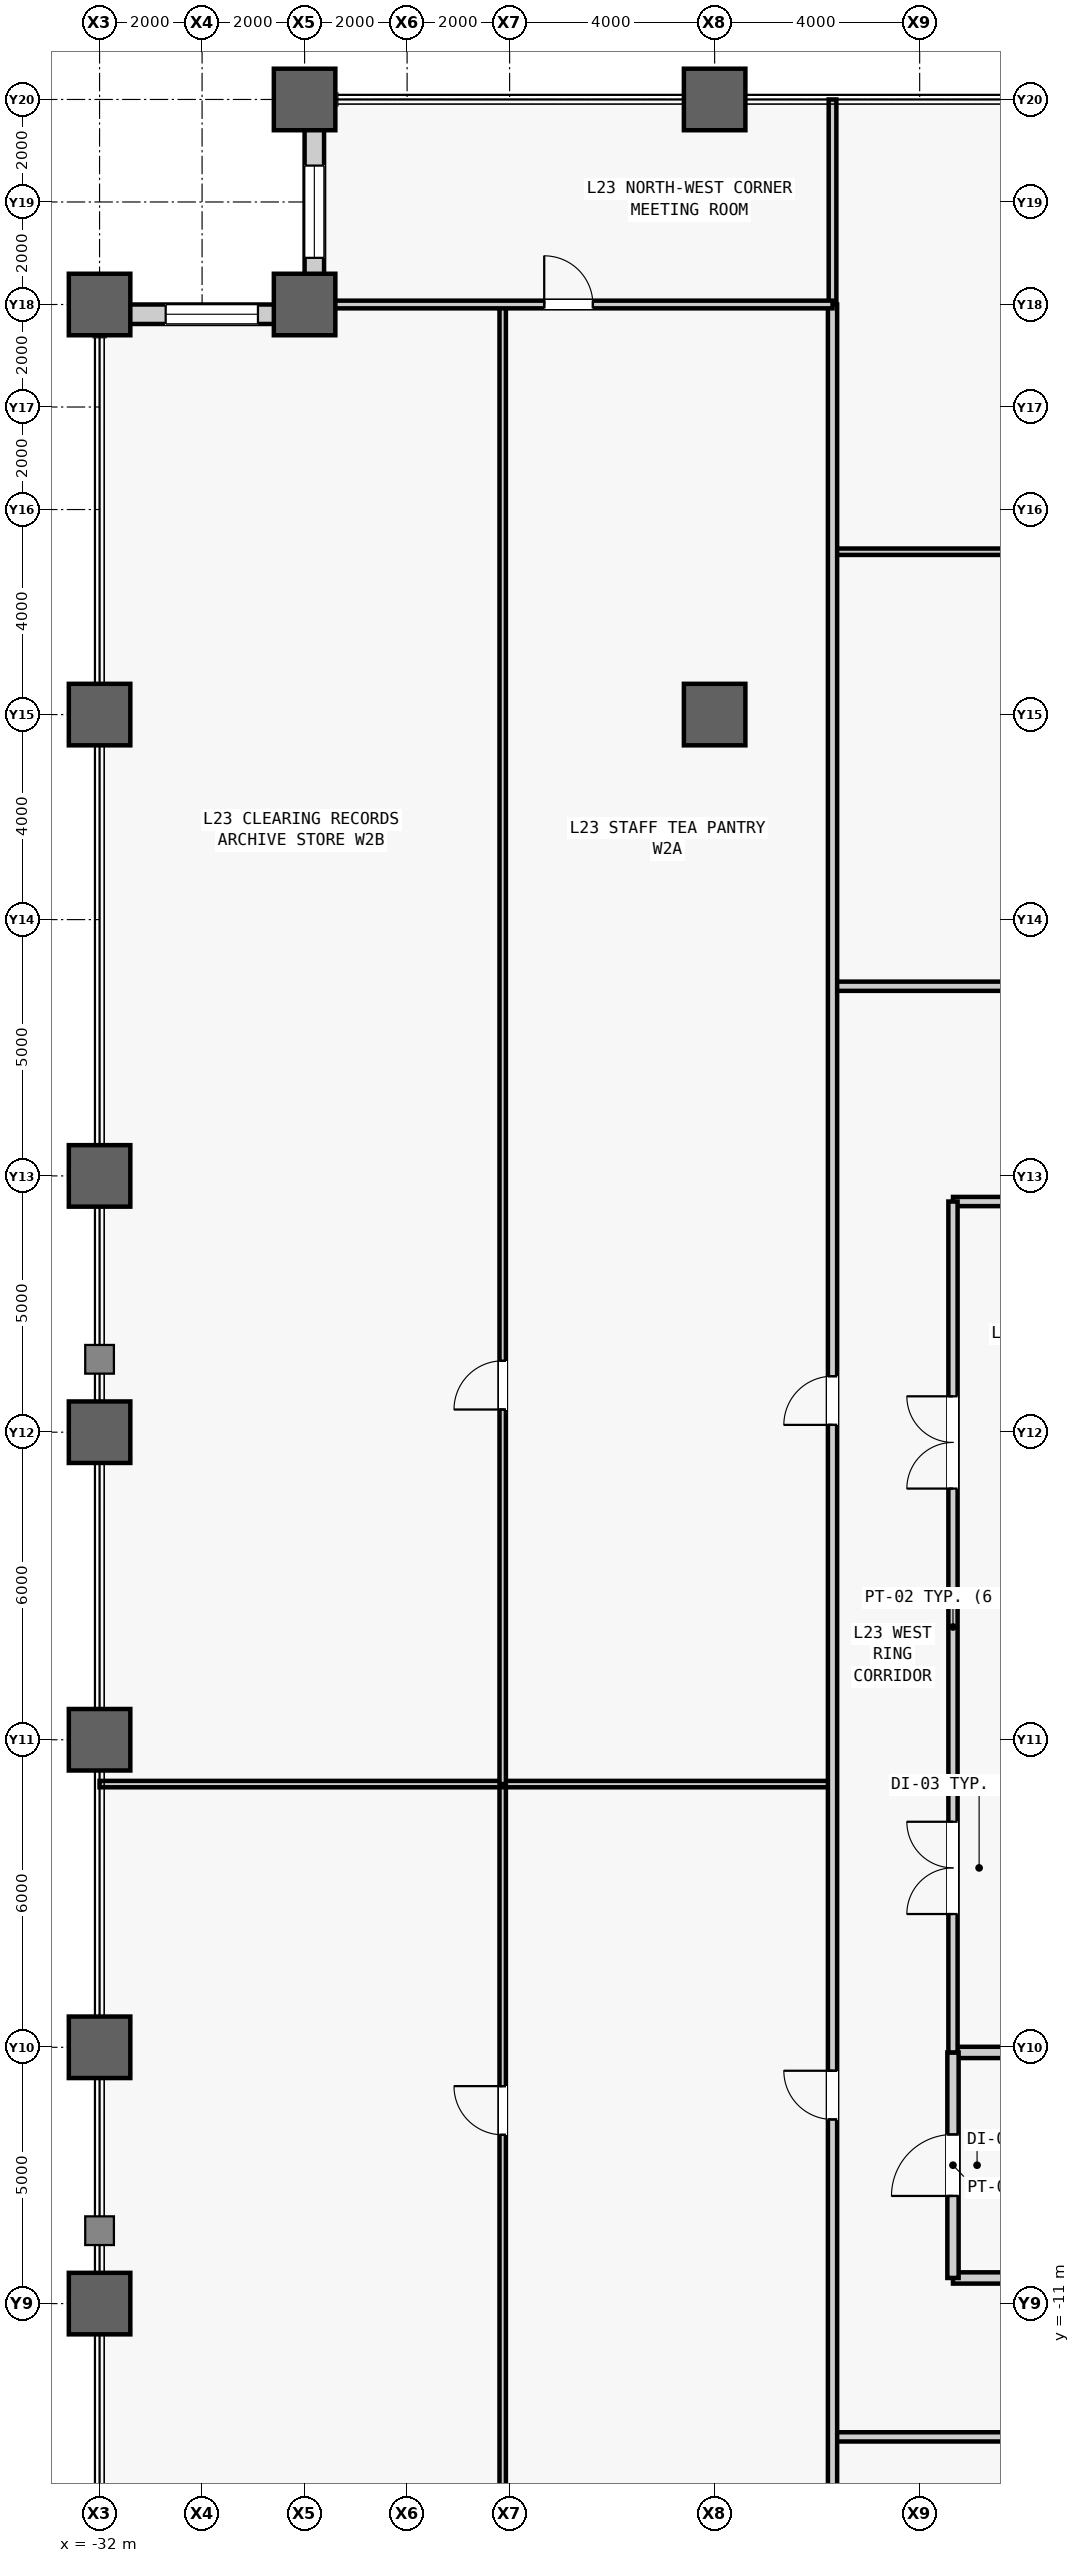
"""IFC4 building model, lengths in metres.
Left out: names, types, materials, properties, quantities, classifications, styles, units other than length and angle.
Written with IfcOpenShell. Run it as: python <this file> out.ifc"""

import sys

from ifc_helpers import new_model, si_unit, direction, frame, frame_2d, origin, origin_2d, place, context, subcontext, project, spatial, rectangle, hollow_rectangle, extrude, source, transform, mapped, element, fill, save


model = new_model("IFC4")
c1 = context("Model", 3, precision=1e-05, world=origin(), true_north=direction((0.0, 1.0)))
c2 = subcontext(c1, "Body", "Model", "MODEL_VIEW")
j1 = project(units=[si_unit("LENGTHUNIT", "METRE"), si_unit("PLANEANGLEUNIT", "RADIAN")], contexts=[c1])
p1 = place(None, origin())
s1 = spatial("IfcSite", under=j1, at=p1, CompositionType="ELEMENT")
p2 = place(p1, origin())
s2 = spatial("IfcBuilding", under=s1, at=p2, CompositionType="ELEMENT")
p3 = place(p2, frame((0.0, 0.0, 103.7)))
s3 = spatial("IfcBuildingStorey", under=s2, at=p3, CompositionType="ELEMENT", Elevation=103.7)
m1 = source(origin(), c2, "Body", "SweptSolid", [
    extrude(hollow_rectangle(XDim=1.2, YDim=1.2, WallThickness=0.07, at=origin_2d()), origin(), (0.0, 0.0, 1.0), 4.1),
])
for number, where, z_axis, x_axis in (
    (1, (-32.0, -11.0, 0.0), (0.0, 0.0, 1.0), (1.0, 0.0, 0.0)),
    (2, (-32.0, -6.0, 0.0), (0.0, 0.0, 1.0), (1.0, 0.0, 0.0)),
    (3, (-32.0, 0.0, 0.0), (0.0, 0.0, 1.0), (1.0, 0.0, 0.0)),
    (4, (-32.0, 6.0, 0.0), (0.0, 0.0, 1.0), (1.0, 0.0, 0.0)),
    (5, (-32.0, 11.0, 0.0), (0.0, 0.0, 1.0), (1.0, 0.0, 0.0)),
    (6, (-32.0, 20.0, 0.0), (0.0, 0.0, 1.0), (1.0, 0.0, 0.0)),
    (7, (-32.0, 28.0, 0.0), (0.0, 0.0, 1.0), (1.0, 0.0, 0.0)),
    (8, (-28.0, 28.0, 0.0), (0.0, 0.0, 1.0), (1.0, 0.0, 0.0)),
    (9, (-28.0, 32.0, 0.0), (0.0, 0.0, 1.0), (1.0, 0.0, 0.0)),
    (10, (-20.0, 20.0, 0.0), (0.0, 0.0, 1.0), (1.0, 0.0, 0.0)),
    (11, (-20.0, 32.0, 0.0), (0.0, 0.0, 1.0), (1.0, 0.0, 0.0)),
):
    element("IfcColumn", number, at=place(p3, frame(where, z_axis=z_axis, x_axis=x_axis)), inside=s3, PredefinedType="COLUMN", context=c2, shape_type="MappedRepresentation", body=[
        mapped(m1, transform((0.0, 0.0, 0.0), scale=1.0)),
    ])
m2 = source(origin(), c2, "Body", "SweptSolid", [
    extrude(rectangle(XDim=3.62, YDim=0.38, at=frame_2d((1.81, 0.0))), origin(), (0.0, 0.0, 1.0), 3.145),
])
p4 = place(p3, frame((-27.81, 28.0, 0.0), z_axis=(0.0, 0.0, 1.0), x_axis=(0.0, 1.0, 0.0)))
e12 = element("IfcWall", 12, at=p4, inside=s3, PredefinedType="STANDARD", context=c2, shape_type="MappedRepresentation", body=[
    mapped(m2, transform((0.0, 0.0, 0.0), scale=1.0)),
])
m3 = source(origin(), c2, "Body", "SweptSolid", [
    extrude(rectangle(XDim=1.8, YDim=2.4, at=frame_2d((0.9, 1.2))), frame((0.0, 0.2, 0.0), z_axis=(0.0, -1.0, 0.0), x_axis=(1.0, 0.0, 0.0)), (0.0, 0.0, 1.0), 0.4),
])
p5 = place(p4, frame((0.91, 0.0, 0.5)))
e13 = element("IfcOpeningElement", 13, at=p5, cuts=e12, PredefinedType="OPENING", context=c2, shape_type="MappedRepresentation", body=[
    mapped(m3, transform((0.0, 0.0, 0.0), scale=1.0)),
])
p6 = place(p3, frame((-28.0, 27.81, 0.0), z_axis=(0.0, 0.0, 1.0), x_axis=(-1.0, 0.0, 0.0)))
e14 = element("IfcWall", 14, at=p6, inside=s3, PredefinedType="STANDARD", context=c2, shape_type="MappedRepresentation", body=[
    mapped(m2, transform((0.0, 0.0, 0.0), scale=1.0)),
])
p7 = place(p6, frame((0.91, 0.0, 0.5)))
e15 = element("IfcOpeningElement", 15, at=p7, cuts=e14, PredefinedType="OPENING", context=c2, shape_type="MappedRepresentation", body=[
    mapped(m3, transform((0.0, 0.0, 0.0), scale=1.0)),
])
m4 = source(origin(), c2, "Body", "SweptSolid", [
    extrude(rectangle(XDim=4.05, YDim=0.22, at=frame_2d((2.025, 0.0))), origin(), (0.0, 0.0, 1.0), 3.84),
])
p8 = place(p3, frame((-15.35, -10.5, 0.0), z_axis=(0.0, 0.0, 1.0), x_axis=(1.0, 0.0, 0.0)))
e16 = element("IfcWall", 16, at=p8, inside=s3, PredefinedType="PARTITIONING", context=c2, shape_type="MappedRepresentation", body=[
    mapped(m4, transform((0.0, 0.0, 0.0), scale=1.0)),
])
m5 = source(origin(), c2, "Body", "SweptSolid", [
    extrude(rectangle(XDim=4.05, YDim=0.22, at=frame_2d((2.025, 0.0))), origin(), (0.0, 0.0, 1.0), 3.067),
])
p9 = place(p3, frame((-15.35, -6.1, 0.0), z_axis=(0.0, 0.0, 1.0), x_axis=(1.0, 0.0, 0.0)))
e17 = element("IfcWall", 17, at=p9, inside=s3, PredefinedType="PARTITIONING", context=c2, shape_type="MappedRepresentation", body=[
    mapped(m5, transform((0.0, 0.0, 0.0), scale=1.0)),
])
m6 = source(origin(), c2, "Body", "SweptSolid", [
    extrude(rectangle(XDim=4.4, YDim=0.22, at=frame_2d((2.2, 0.0))), origin(), (0.0, 0.0, 1.0), 3.84),
])
p10 = place(p3, frame((-15.35, -10.5, 0.0), z_axis=(0.0, 0.0, 1.0), x_axis=(0.0, 1.0, 0.0)))
e18 = element("IfcWall", 18, at=p10, inside=s3, PredefinedType="PARTITIONING", context=c2, shape_type="MappedRepresentation", body=[
    mapped(m6, transform((0.0, 0.0, 0.0), scale=1.0)),
])
m7 = source(origin(), c2, "Body", "SweptSolid", [
    extrude(rectangle(XDim=1.2, YDim=2.2, at=frame_2d((0.6, 1.1))), frame((0.0, 0.12, 0.0), z_axis=(0.0, -1.0, 0.0), x_axis=(1.0, 0.0, 0.0)), (0.0, 0.0, 1.0), 0.24),
])
p11 = place(p10, frame((1.6, 0.0, 0.0)))
e19 = element("IfcOpeningElement", 19, at=p11, cuts=e18, PredefinedType="OPENING", context=c2, shape_type="MappedRepresentation", body=[
    mapped(m7, transform((0.0, 0.0, 0.0), scale=1.0)),
])
m8 = source(origin(), c2, "Body", "SweptSolid", [
    extrude(rectangle(XDim=4.05, YDim=0.18, at=frame_2d((2.025, 0.0))), origin(), (0.0, 0.0, 1.0), 3.84),
])
p12 = place(p3, frame((-15.35, 10.5, 0.0), z_axis=(0.0, 0.0, 1.0), x_axis=(1.0, 0.0, 0.0)))
e20 = element("IfcWall", 20, at=p12, inside=s3, PredefinedType="PARTITIONING", context=c2, shape_type="MappedRepresentation", body=[
    mapped(m8, transform((0.0, 0.0, 0.0), scale=1.0)),
])
m9 = source(origin(), c2, "Body", "SweptSolid", [
    extrude(rectangle(XDim=16.6, YDim=0.18, at=frame_2d((8.3, 0.0))), origin(), (0.0, 0.0, 1.0), 3.84),
])
p13 = place(p3, frame((-15.35, -6.1, 0.0), z_axis=(0.0, 0.0, 1.0), x_axis=(0.0, 1.0, 0.0)))
e21 = element("IfcWall", 21, at=p13, inside=s3, PredefinedType="PARTITIONING", context=c2, shape_type="MappedRepresentation", body=[
    mapped(m9, transform((0.0, 0.0, 0.0), scale=1.0)),
])
m10 = source(origin(), c2, "Body", "SweptSolid", [
    extrude(rectangle(XDim=1.8, YDim=2.25, at=frame_2d((0.9, 1.125))), frame((0.0, 0.1, 0.0), z_axis=(0.0, -1.0, 0.0), x_axis=(1.0, 0.0, 0.0)), (0.0, 0.0, 1.0), 0.2),
])
p14 = place(p13, frame((2.7, 0.0, 0.0)))
e22 = element("IfcOpeningElement", 22, at=p14, cuts=e21, PredefinedType="OPENING", context=c2, shape_type="MappedRepresentation", body=[
    mapped(m10, transform((0.0, 0.0, 0.0), scale=1.0)),
])
p15 = place(p13, frame((11.0, 0.0, 0.0)))
e23 = element("IfcOpeningElement", 23, at=p15, cuts=e21, PredefinedType="OPENING", context=c2, shape_type="MappedRepresentation", body=[
    mapped(m10, transform((0.0, 0.0, 0.0), scale=1.0)),
])
m11 = source(origin(), c2, "Body", "SweptSolid", [
    extrude(rectangle(XDim=36.25, YDim=0.18, at=frame_2d((18.125, 0.0))), origin(), (0.0, 0.0, 1.0), 3.84),
])
p16 = place(p3, frame((-17.7, -13.6, 0.0), z_axis=(0.0, 0.0, 1.0), x_axis=(1.0, 0.0, 0.0)))
e24 = element("IfcWall", 24, at=p16, inside=s3, PredefinedType="PARTITIONING", context=c2, shape_type="MappedRepresentation", body=[
    mapped(m11, transform((0.0, 0.0, 0.0), scale=1.0)),
])
m12 = source(origin(), c2, "Body", "SweptSolid", [
    extrude(rectangle(XDim=1.05, YDim=2.2, at=frame_2d((0.525, 1.1))), frame((0.0, 0.1, 0.0), z_axis=(0.0, -1.0, 0.0), x_axis=(1.0, 0.0, 0.0)), (0.0, 0.0, 1.0), 0.2),
])
p17 = place(p16, frame((6.925, 0.0, 0.0)))
e25 = element("IfcOpeningElement", 25, at=p17, cuts=e24, PredefinedType="OPENING", context=c2, shape_type="MappedRepresentation", body=[
    mapped(m12, transform((0.0, 0.0, 0.0), scale=1.0)),
])
p18 = place(p16, frame((17.6, 0.0, 0.0)))
e26 = element("IfcOpeningElement", 26, at=p18, cuts=e24, PredefinedType="OPENING", context=c2, shape_type="MappedRepresentation", body=[
    mapped(m12, transform((0.0, 0.0, 0.0), scale=1.0)),
])
p19 = place(p16, frame((27.85, 0.0, 0.0)))
e27 = element("IfcOpeningElement", 27, at=p19, cuts=e24, PredefinedType="OPENING", context=c2, shape_type="MappedRepresentation", body=[
    mapped(m12, transform((0.0, 0.0, 0.0), scale=1.0)),
])
m13 = source(origin(), c2, "Body", "SweptSolid", [
    extrude(rectangle(XDim=36.25, YDim=0.125, at=frame_2d((18.125, 0.0))), origin(), (0.0, 0.0, 1.0), 3.84),
])
p20 = place(p3, frame((-17.7, 23.177, 0.0), z_axis=(0.0, 0.0, 1.0), x_axis=(1.0, 0.0, 0.0)))
e28 = element("IfcWall", 28, at=p20, inside=s3, PredefinedType="PARTITIONING", context=c2, shape_type="MappedRepresentation", body=[
    mapped(m13, transform((0.0, 0.0, 0.0), scale=1.0)),
])
m14 = source(origin(), c2, "Body", "SweptSolid", [
    extrude(rectangle(XDim=0.95, YDim=2.15, at=frame_2d((0.475, 1.075))), frame((0.0, 0.073, 0.0), z_axis=(0.0, -1.0, 0.0), x_axis=(1.0, 0.0, 0.0)), (0.0, 0.0, 1.0), 0.145),
])
p21 = place(p20, frame((17.65, 0.0, 0.0)))
e29 = element("IfcOpeningElement", 29, at=p21, cuts=e28, PredefinedType="OPENING", context=c2, shape_type="MappedRepresentation", body=[
    mapped(m14, transform((0.0, 0.0, 0.0), scale=1.0)),
])
p22 = place(p3, frame((-17.7, 14.7, 0.0), z_axis=(0.0, 0.0, 1.0), x_axis=(1.0, 0.0, 0.0)))
e30 = element("IfcWall", 30, at=p22, inside=s3, PredefinedType="PARTITIONING", context=c2, shape_type="MappedRepresentation", body=[
    mapped(m11, transform((0.0, 0.0, 0.0), scale=1.0)),
])
p23 = place(p22, frame((17.175, 0.0, 0.0)))
e31 = element("IfcOpeningElement", 31, at=p23, cuts=e30, PredefinedType="OPENING", context=c2, shape_type="MappedRepresentation", body=[
    mapped(m12, transform((0.0, 0.0, 0.0), scale=1.0)),
])
m15 = source(origin(), c2, "Body", "SweptSolid", [
    extrude(rectangle(XDim=4.0, YDim=0.15, at=frame_2d((2.0, 0.0))), origin(), (0.0, 0.0, 1.0), 3.84),
])
p24 = place(p3, frame((-17.7, 28.0, 0.0), z_axis=(0.0, 0.0, 1.0), x_axis=(0.0, 1.0, 0.0)))
e32 = element("IfcWall", 32, at=p24, inside=s3, PredefinedType="PARTITIONING", context=c2, shape_type="MappedRepresentation", body=[
    mapped(m15, transform((0.0, 0.0, 0.0), scale=1.0)),
])
m16 = source(origin(), c2, "Body", "SweptSolid", [
    extrude(rectangle(XDim=27.135, YDim=0.125, at=frame_2d((13.567, 0.0))), origin(), (0.0, 0.0, 1.0), 3.84),
])
p25 = place(p3, frame((-24.135, -28.0, 0.0), z_axis=(0.0, 0.0, 1.0), x_axis=(0.0, 1.0, 0.0)))
e33 = element("IfcWall", 33, at=p25, inside=s3, PredefinedType="PARTITIONING", context=c2, shape_type="MappedRepresentation", body=[
    mapped(m16, transform((0.0, 0.0, 0.0), scale=1.0)),
])
p26 = place(p25, frame((20.292, 0.0, 0.0)))
e34 = element("IfcOpeningElement", 34, at=p26, cuts=e33, PredefinedType="OPENING", context=c2, shape_type="MappedRepresentation", body=[
    mapped(m14, transform((0.0, 0.0, 0.0), scale=1.0)),
])
m17 = source(origin(), c2, "Body", "SweptSolid", [
    extrude(rectangle(XDim=14.3, YDim=0.125, at=frame_2d((7.15, 0.0))), origin(), (0.0, 0.0, 1.0), 3.84),
])
p27 = place(p3, frame((-32.0, -0.865, 0.0), z_axis=(0.0, 0.0, 1.0), x_axis=(1.0, 0.0, 0.0)))
e35 = element("IfcWall", 35, at=p27, inside=s3, PredefinedType="PARTITIONING", context=c2, shape_type="MappedRepresentation", body=[
    mapped(m17, transform((0.0, 0.0, 0.0), scale=1.0)),
])
m18 = source(origin(), c2, "Body", "SweptSolid", [
    extrude(rectangle(XDim=28.865, YDim=0.125, at=frame_2d((14.433, 0.0))), origin(), (0.0, 0.0, 1.0), 3.84),
])
p28 = place(p3, frame((-24.135, -0.865, 0.0), z_axis=(0.0, 0.0, 1.0), x_axis=(0.0, 1.0, 0.0)))
e36 = element("IfcWall", 36, at=p28, inside=s3, PredefinedType="PARTITIONING", context=c2, shape_type="MappedRepresentation", body=[
    mapped(m18, transform((0.0, 0.0, 0.0), scale=1.0)),
])
p29 = place(p28, frame((7.308, 0.0, 0.0)))
e37 = element("IfcOpeningElement", 37, at=p29, cuts=e36, PredefinedType="OPENING", context=c2, shape_type="MappedRepresentation", body=[
    mapped(m14, transform((0.0, 0.0, 0.0), scale=1.0)),
])
m19 = source(origin(), c2, "Body", "SweptSolid", [
    extrude(rectangle(XDim=56.0, YDim=0.18, at=frame_2d((28.0, 0.0))), origin(), (0.0, 0.0, 1.0), 3.84),
])
p30 = place(p3, frame((-17.7, -28.0, 0.0), z_axis=(0.0, 0.0, 1.0), x_axis=(0.0, 1.0, 0.0)))
e38 = element("IfcWall", 38, at=p30, inside=s3, PredefinedType="PARTITIONING", context=c2, shape_type="MappedRepresentation", body=[
    mapped(m19, transform((0.0, 0.0, 0.0), scale=1.0)),
])
m20 = source(origin(), c2, "Body", "SweptSolid", [
    extrude(rectangle(XDim=0.95, YDim=2.15, at=frame_2d((0.475, 1.075))), frame((0.0, 0.1, 0.0), z_axis=(0.0, -1.0, 0.0), x_axis=(1.0, 0.0, 0.0)), (0.0, 0.0, 1.0), 0.2),
])
p31 = place(p30, frame((20.593, 0.0, 0.0)))
e39 = element("IfcOpeningElement", 39, at=p31, cuts=e38, PredefinedType="OPENING", context=c2, shape_type="MappedRepresentation", body=[
    mapped(m20, transform((0.0, 0.0, 0.0), scale=1.0)),
])
p32 = place(p30, frame((34.143, 0.0, 0.0)))
e40 = element("IfcOpeningElement", 40, at=p32, cuts=e38, PredefinedType="OPENING", context=c2, shape_type="MappedRepresentation", body=[
    mapped(m20, transform((0.0, 0.0, 0.0), scale=1.0)),
])
m21 = source(origin(), c2, "Body", "SweptSolid", [
    extrude(rectangle(XDim=10.3, YDim=0.15, at=frame_2d((5.15, 0.0))), origin(), (0.0, 0.0, 1.0), 3.84),
])
p33 = place(p3, frame((-28.0, 28.0, 0.0), z_axis=(0.0, 0.0, 1.0), x_axis=(1.0, 0.0, 0.0)))
e41 = element("IfcWall", 41, at=p33, inside=s3, PredefinedType="PARTITIONING", context=c2, shape_type="MappedRepresentation", body=[
    mapped(m21, transform((0.0, 0.0, 0.0), scale=1.0)),
])
m22 = source(origin(), c2, "Body", "SweptSolid", [
    extrude(rectangle(XDim=0.95, YDim=2.15, at=frame_2d((0.475, 1.075))), frame((0.0, 0.085, 0.0), z_axis=(0.0, -1.0, 0.0), x_axis=(1.0, 0.0, 0.0)), (0.0, 0.0, 1.0), 0.17),
])
p34 = place(p33, frame((4.675, 0.0, 0.0)))
e42 = element("IfcOpeningElement", 42, at=p34, cuts=e41, PredefinedType="OPENING", context=c2, shape_type="MappedRepresentation", body=[
    mapped(m22, transform((0.0, 0.0, 0.0), scale=1.0)),
])
m23 = source(origin(), c2, "Body", "SweptSolid", [
    extrude(rectangle(XDim=1.8, YDim=2.4, at=frame_2d((0.9, 1.2))), frame((0.0, 0.03, 0.0), z_axis=(0.0, -1.0, 0.0), x_axis=(1.0, 0.0, 0.0)), (0.0, 0.0, 1.0), 0.06),
])
p35 = place(p5, origin())
e43 = element("IfcWindow", 43, at=p35, inside=s3, PartitioningType="SINGLE_PANEL", PredefinedType="WINDOW", context=c2, shape_type="MappedRepresentation", body=[
    mapped(m23, transform((0.0, 0.0, 0.0), scale=1.0)),
])
fill(e13, e43)
p36 = place(p7, origin())
e44 = element("IfcWindow", 44, at=p36, inside=s3, PartitioningType="SINGLE_PANEL", PredefinedType="WINDOW", context=c2, shape_type="MappedRepresentation", body=[
    mapped(m23, transform((0.0, 0.0, 0.0), scale=1.0)),
])
fill(e15, e44)
m24 = source(origin(), c2, "Body", "SweptSolid", [
    extrude(rectangle(XDim=1.2, YDim=2.2, at=frame_2d((0.6, 1.1))), frame((0.0, 0.025, 0.0), z_axis=(0.0, -1.0, 0.0), x_axis=(1.0, 0.0, 0.0)), (0.0, 0.0, 1.0), 0.05),
])
p37 = place(p11, origin())
e45 = element("IfcDoor", 45, at=p37, inside=s3, OperationType="SINGLE_SWING_LEFT", PredefinedType="DOOR", context=c2, shape_type="MappedRepresentation", body=[
    mapped(m24, transform((0.0, 0.0, 0.0), scale=1.0)),
])
fill(e19, e45)
m25 = source(origin(), c2, "Body", "SweptSolid", [
    extrude(rectangle(XDim=1.8, YDim=2.25, at=frame_2d((0.9, 1.125))), frame((0.0, 0.025, 0.0), z_axis=(0.0, -1.0, 0.0), x_axis=(1.0, 0.0, 0.0)), (0.0, 0.0, 1.0), 0.05),
])
p38 = place(p14, origin())
e46 = element("IfcDoor", 46, at=p38, inside=s3, OperationType="SINGLE_SWING_LEFT", PredefinedType="DOOR", context=c2, shape_type="MappedRepresentation", body=[
    mapped(m25, transform((0.0, 0.0, 0.0), scale=1.0)),
])
fill(e22, e46)
p39 = place(p15, origin())
e47 = element("IfcDoor", 47, at=p39, inside=s3, OperationType="SINGLE_SWING_RIGHT", PredefinedType="DOOR", context=c2, shape_type="MappedRepresentation", body=[
    mapped(m25, transform((0.0, 0.0, 0.0), scale=1.0)),
])
fill(e23, e47)
m26 = source(origin(), c2, "Body", "SweptSolid", [
    extrude(rectangle(XDim=0.95, YDim=2.15, at=frame_2d((0.475, 1.075))), frame((0.0, 0.025, 0.0), z_axis=(0.0, -1.0, 0.0), x_axis=(1.0, 0.0, 0.0)), (0.0, 0.0, 1.0), 0.05),
])
p40 = place(p26, origin())
e48 = element("IfcDoor", 48, at=p40, inside=s3, OperationType="SINGLE_SWING_RIGHT", PredefinedType="DOOR", context=c2, shape_type="MappedRepresentation", body=[
    mapped(m26, transform((0.0, 0.0, 0.0), scale=1.0)),
])
fill(e34, e48)
p41 = place(p29, origin())
e49 = element("IfcDoor", 49, at=p41, inside=s3, OperationType="SINGLE_SWING_LEFT", PredefinedType="DOOR", context=c2, shape_type="MappedRepresentation", body=[
    mapped(m26, transform((0.0, 0.0, 0.0), scale=1.0)),
])
fill(e37, e49)
p42 = place(p31, origin())
e50 = element("IfcDoor", 50, at=p42, inside=s3, OperationType="SINGLE_SWING_RIGHT", PredefinedType="DOOR", context=c2, shape_type="MappedRepresentation", body=[
    mapped(m26, transform((0.0, 0.0, 0.0), scale=1.0)),
])
fill(e39, e50)
p43 = place(p32, origin())
e51 = element("IfcDoor", 51, at=p43, inside=s3, OperationType="SINGLE_SWING_LEFT", PredefinedType="DOOR", context=c2, shape_type="MappedRepresentation", body=[
    mapped(m26, transform((0.0, 0.0, 0.0), scale=1.0)),
])
fill(e40, e51)
p44 = place(p34, origin())
e52 = element("IfcDoor", 52, at=p44, inside=s3, OperationType="SINGLE_SWING_LEFT", PredefinedType="DOOR", context=c2, shape_type="MappedRepresentation", body=[
    mapped(m26, transform((0.0, 0.0, 0.0), scale=1.0)),
])
fill(e42, e52)
save(model, sys.argv[1])
